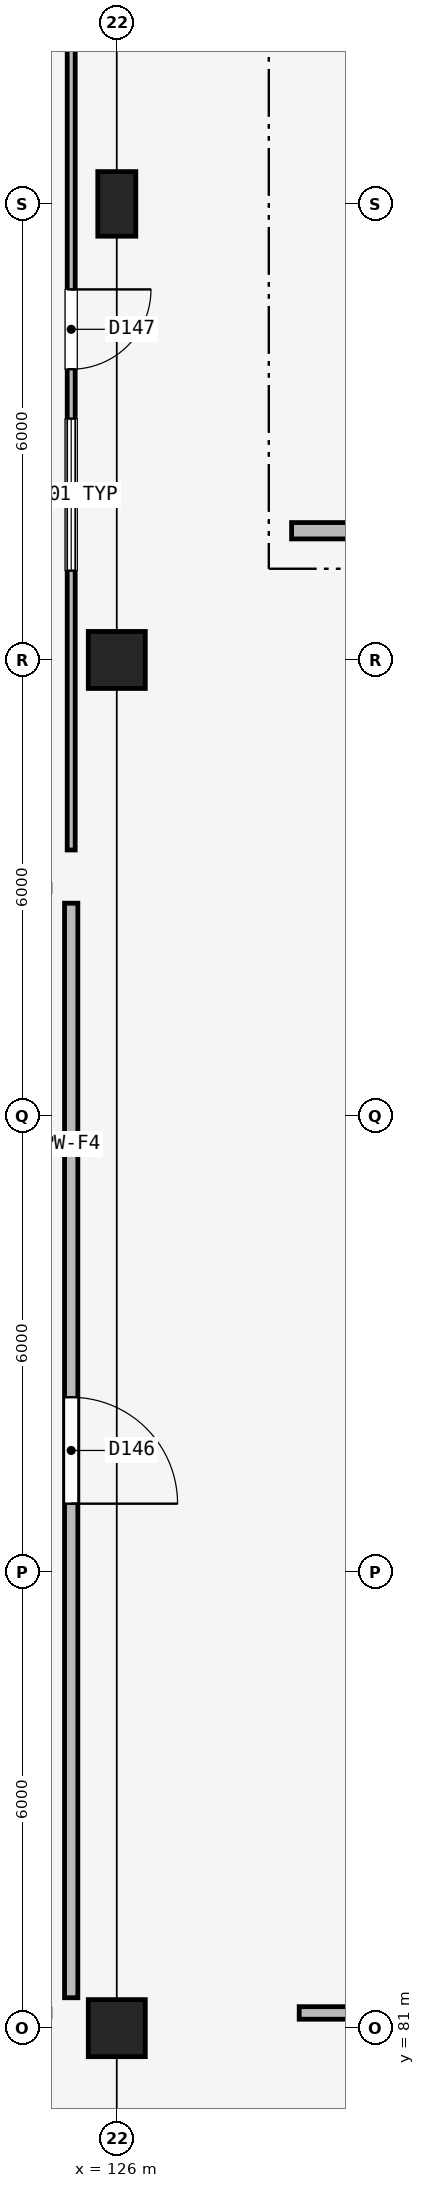
"""IFC4 building model, lengths in metres.
Left out: names, types, materials, properties, quantities, classifications, styles, units other than length and angle.
Written with IfcOpenShell. Run it as: python <this file> out.ifc"""

import sys

from ifc_helpers import new_model, si_unit, direction, frame, frame_2d, origin, origin_2d, place, context, subcontext, project, spatial, rectangle, extrude, element, fill, save


model = new_model("IFC4")
c1 = context("Model", 3, precision=1e-05, world=origin(), true_north=direction((0.0, 1.0)))
c2 = subcontext(c1, "Body", "Model", "MODEL_VIEW")
j1 = project(units=[si_unit("LENGTHUNIT", "METRE"), si_unit("PLANEANGLEUNIT", "RADIAN")], contexts=[c1])
p1 = place(None, origin())
s1 = spatial("IfcSite", under=j1, at=p1, CompositionType="ELEMENT")
p2 = place(p1, origin())
s2 = spatial("IfcBuilding", under=s1, at=p2, CompositionType="ELEMENT")
p3 = place(p2, frame((0.0, 0.0, -4.5)))
s3 = spatial("IfcBuildingStorey", under=s2, at=p3, CompositionType="ELEMENT", Elevation=-4.5)
for number, where, z_axis, x_axis in (
    (1, (126.0, 81.0, 0.0), (0.0, 0.0, 1.0), (1.0, 0.0, 0.0)),
    (2, (126.0, 99.0, 0.0), (0.0, 0.0, 1.0), (1.0, 0.0, 0.0)),
):
    element("IfcColumn", number, at=place(p3, frame(where, z_axis=z_axis, x_axis=x_axis)), inside=s3, PredefinedType="COLUMN", context=c2, shape_type="SweptSolid", body=[
        extrude(rectangle(XDim=0.75, YDim=0.75, at=origin_2d()), origin(), (0.0, 0.0, 1.0), 4.5),
    ])
p4 = place(p3, frame((126.0, 105.0, 0.0), z_axis=(0.0, 0.0, 1.0), x_axis=(1.0, 0.0, 0.0)))
e3 = element("IfcColumn", 3, at=p4, inside=s3, PredefinedType="COLUMN", context=c2, shape_type="SweptSolid", body=[
    extrude(rectangle(XDim=0.5, YDim=0.85, at=origin_2d()), origin(), (0.0, 0.0, 1.0), 4.5),
])
p5 = place(p3, frame((128.3, 100.7, 0.0), z_axis=(0.0, 0.0, 1.0), x_axis=(1.0, 0.0, 0.0)))
e4 = element("IfcWall", 4, at=p5, inside=s3, PredefinedType="PARTITIONING", context=c2, shape_type="SweptSolid", body=[
    extrude(rectangle(XDim=4.1, YDim=0.215, at=frame_2d((2.05, 0.0))), origin(), (0.0, 0.0, 1.0), 3.44),
])
p6 = place(p5, frame((1.3, 0.0, 0.0)))
e5 = element("IfcOpeningElement", 5, at=p6, cuts=e4, PredefinedType="OPENING", context=c2, shape_type="SweptSolid", body=[
    extrude(rectangle(XDim=1.5, YDim=2.15, at=frame_2d((0.75, 1.075))), frame((0.0, 0.117, 0.0), z_axis=(0.0, -1.0, 0.0), x_axis=(1.0, 0.0, 0.0)), (0.0, 0.0, 1.0), 0.235),
])
p7 = place(p3, frame((125.4, 95.8, 0.0), z_axis=(0.0, 0.0, 1.0), x_axis=(0.0, -1.0, 0.0)))
e6 = element("IfcWall", 6, at=p7, inside=s3, PredefinedType="PARTITIONING", context=c2, shape_type="SweptSolid", body=[
    extrude(rectangle(XDim=14.4, YDim=0.175, at=frame_2d((7.2, 0.0))), origin(), (0.0, 0.0, 1.0), 4.19),
])
p8 = place(p7, frame((6.5, 0.0, 0.0)))
e7 = element("IfcOpeningElement", 7, at=p8, cuts=e6, PredefinedType="OPENING", context=c2, shape_type="SweptSolid", body=[
    extrude(rectangle(XDim=1.4, YDim=2.25, at=frame_2d((0.7, 1.125))), frame((0.0, 0.097, 0.0), z_axis=(0.0, -1.0, 0.0), x_axis=(1.0, 0.0, 0.0)), (0.0, 0.0, 1.0), 0.195),
])
p9 = place(p3, frame((125.4, 110.2, 0.0), z_axis=(0.0, 0.0, 1.0), x_axis=(0.0, -1.0, 0.0)))
e8 = element("IfcWall", 8, at=p9, inside=s3, PredefinedType="PARTITIONING", context=c2, shape_type="SweptSolid", body=[
    extrude(rectangle(XDim=13.7, YDim=0.105, at=frame_2d((6.85, 0.0))), origin(), (0.0, 0.0, 1.0), 3.49),
])
p10 = place(p9, frame((6.325, 0.0, 0.0)))
e9 = element("IfcOpeningElement", 9, at=p10, cuts=e8, PredefinedType="OPENING", context=c2, shape_type="SweptSolid", body=[
    extrude(rectangle(XDim=1.05, YDim=2.2, at=frame_2d((0.525, 1.1))), frame((0.0, 0.062, 0.0), z_axis=(0.0, -1.0, 0.0), x_axis=(1.0, 0.0, 0.0)), (0.0, 0.0, 1.0), 0.125),
])
p11 = place(p9, frame((8.025, 0.0, 1.0)))
e10 = element("IfcOpeningElement", 10, at=p11, cuts=e8, PredefinedType="OPENING", context=c2, shape_type="SweptSolid", body=[
    extrude(rectangle(XDim=2.0, YDim=1.2, at=frame_2d((1.0, 0.6))), frame((0.0, 0.062, 0.0), z_axis=(0.0, -1.0, 0.0), x_axis=(1.0, 0.0, 0.0)), (0.0, 0.0, 1.0), 0.125),
])
p12 = place(p3, frame((149.4, 81.2, 0.0), z_axis=(0.0, 0.0, 1.0), x_axis=(-1.0, 0.0, 0.0)))
e11 = element("IfcWall", 11, at=p12, inside=s3, PredefinedType="PARTITIONING", context=c2, shape_type="SweptSolid", body=[
    extrude(rectangle(XDim=21.0, YDim=0.165, at=frame_2d((10.5, 0.0))), origin(), (0.0, 0.0, 1.0), 3.44),
])
p13 = place(p12, frame((9.5, 0.0, 0.0)))
e12 = element("IfcOpeningElement", 12, at=p13, cuts=e11, PredefinedType="OPENING", context=c2, shape_type="SweptSolid", body=[
    extrude(rectangle(XDim=1.1, YDim=2.1, at=frame_2d((0.55, 1.05))), frame((0.0, 0.093, 0.0), z_axis=(0.0, -1.0, 0.0), x_axis=(1.0, 0.0, 0.0)), (0.0, 0.0, 1.0), 0.185),
])
p14 = place(p8, origin())
e13 = element("IfcDoor", 13, at=p14, inside=s3, OperationType="SINGLE_SWING_RIGHT", PredefinedType="DOOR", context=c2, shape_type="SweptSolid", body=[
    extrude(rectangle(XDim=1.4, YDim=2.25, at=frame_2d((0.7, 1.125))), frame((0.0, 0.025, 0.0), z_axis=(0.0, -1.0, 0.0), x_axis=(1.0, 0.0, 0.0)), (0.0, 0.0, 1.0), 0.05),
])
fill(e7, e13)
p15 = place(p10, origin())
e14 = element("IfcDoor", 14, at=p15, inside=s3, OperationType="SINGLE_SWING_LEFT", PredefinedType="DOOR", context=c2, shape_type="SweptSolid", body=[
    extrude(rectangle(XDim=1.05, YDim=2.2, at=frame_2d((0.525, 1.1))), frame((0.0, 0.025, 0.0), z_axis=(0.0, -1.0, 0.0), x_axis=(1.0, 0.0, 0.0)), (0.0, 0.0, 1.0), 0.05),
])
fill(e9, e14)
p16 = place(p11, origin())
e15 = element("IfcWindow", 15, at=p16, inside=s3, PartitioningType="SINGLE_PANEL", PredefinedType="WINDOW", context=c2, shape_type="SweptSolid", body=[
    extrude(rectangle(XDim=2.0, YDim=1.2, at=frame_2d((1.0, 0.6))), frame((0.0, 0.03, 0.0), z_axis=(0.0, -1.0, 0.0), x_axis=(1.0, 0.0, 0.0)), (0.0, 0.0, 1.0), 0.06),
])
fill(e10, e15)
save(model, sys.argv[1])
